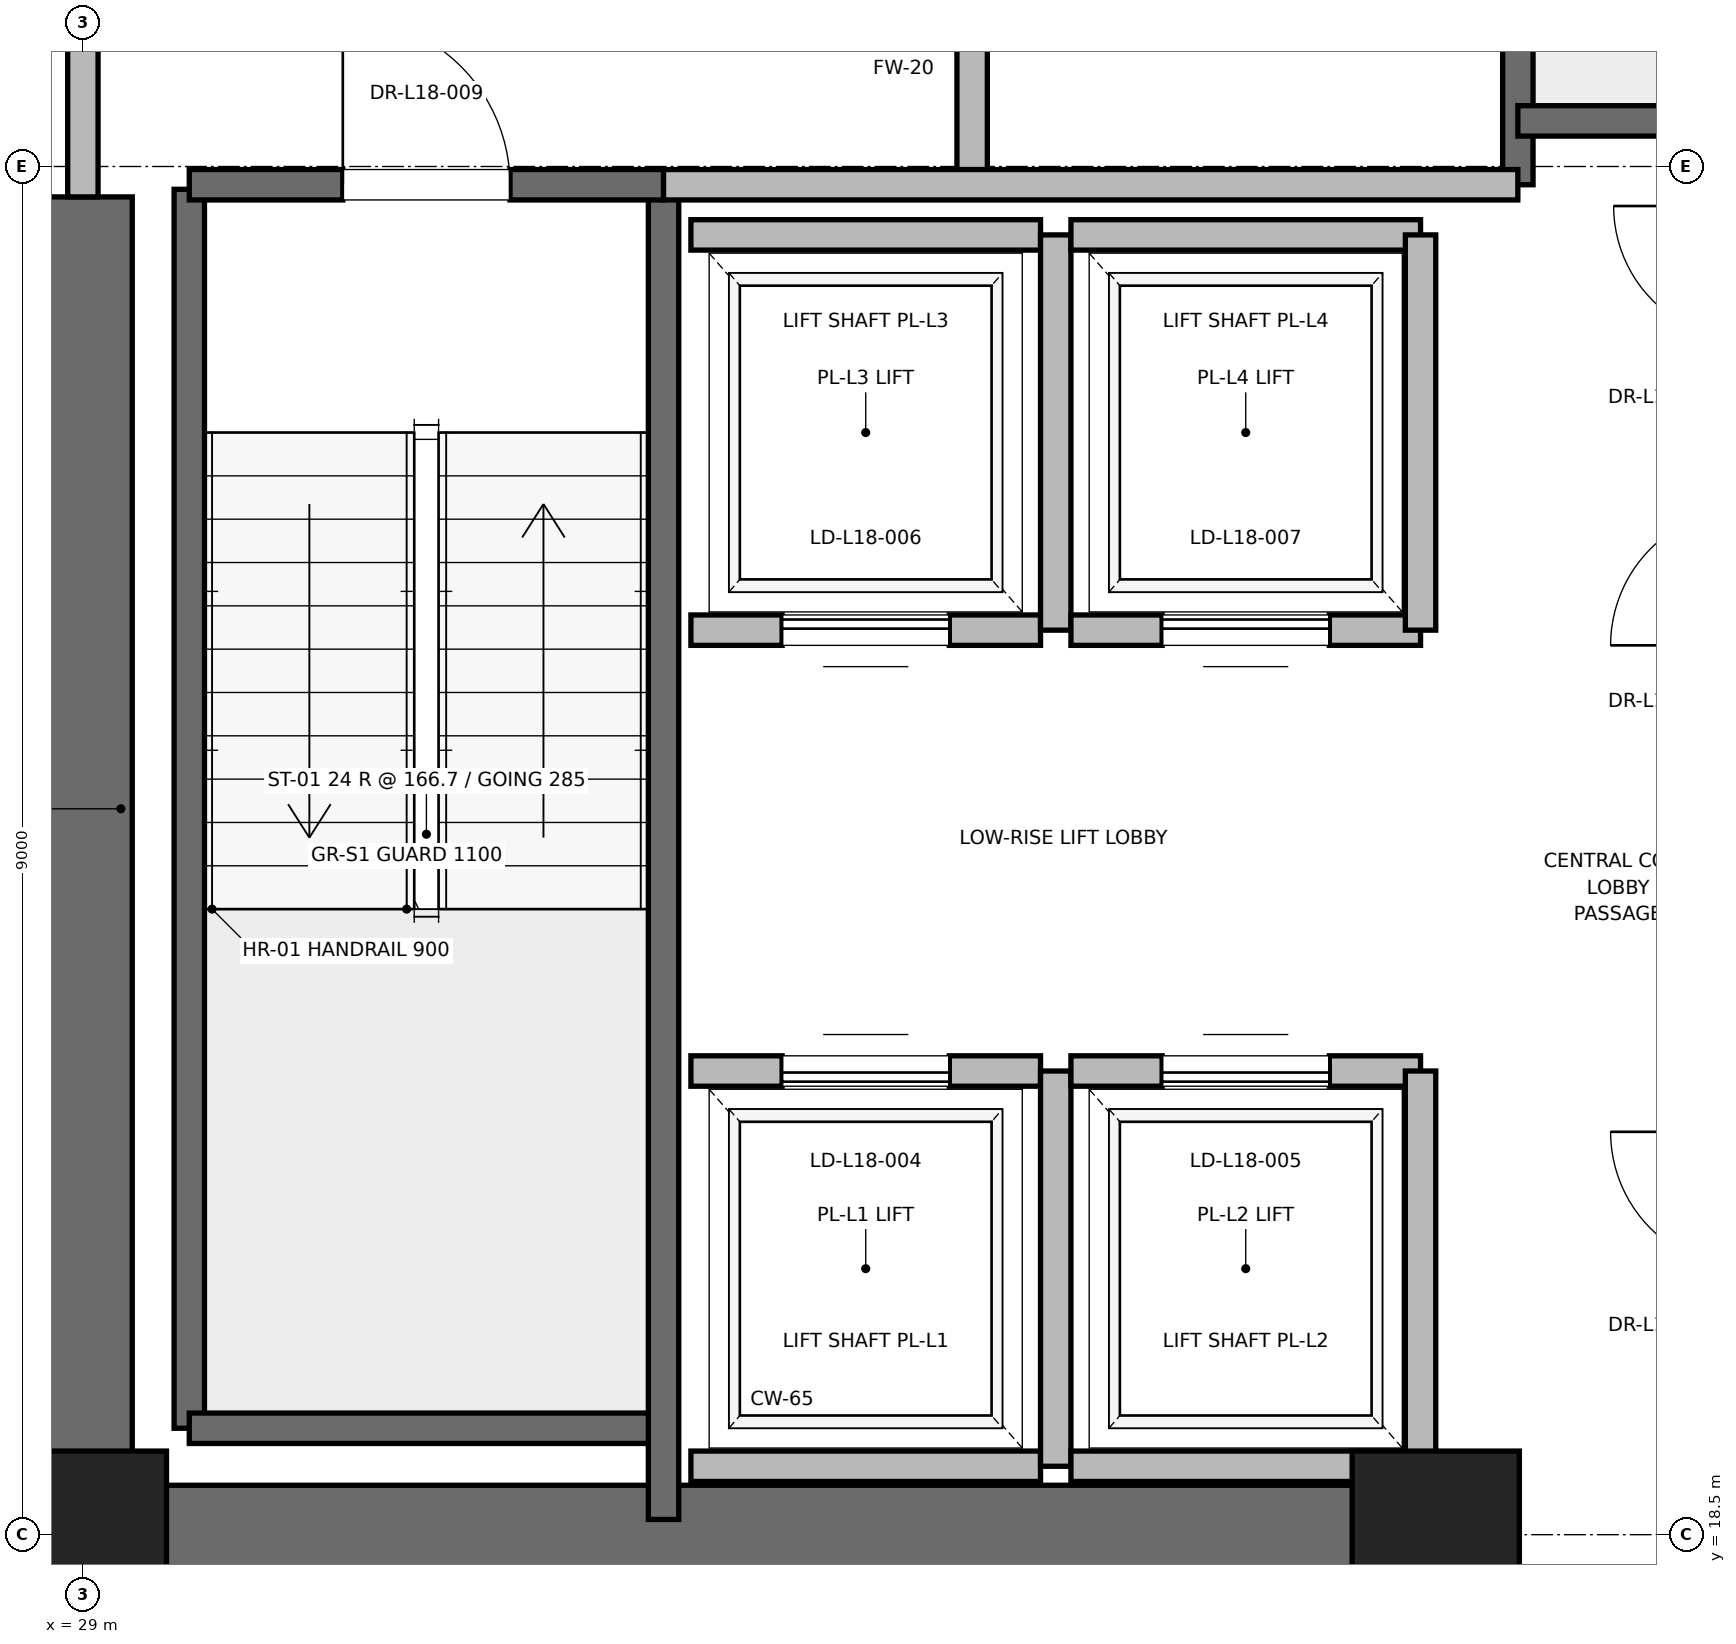
"""IFC4 building model, lengths in metres.
Left out: names, types, materials, properties, quantities, classifications, styles, units other than length and angle.
Written with IfcOpenShell. Run it as: python <this file> out.ifc"""

import sys

from ifc_helpers import new_model, si_unit, direction, frame, frame_2d, origin, origin_2d, place, context, subcontext, project, spatial, rectangle, extrude, element, fill, save


model = new_model("IFC4")
c1 = context("Model", 3, precision=1e-05, world=origin(), true_north=direction((0.0, 1.0)))
c2 = subcontext(c1, "Body", "Model", "MODEL_VIEW")
j1 = project(units=[si_unit("LENGTHUNIT", "METRE"), si_unit("PLANEANGLEUNIT", "RADIAN")], contexts=[c1])
p1 = place(None, origin())
s1 = spatial("IfcSite", under=j1, at=p1, CompositionType="ELEMENT")
p2 = place(p1, origin())
s2 = spatial("IfcBuilding", under=s1, at=p2, CompositionType="ELEMENT")
p3 = place(p2, frame((0.0, 0.0, 79.6)))
s3 = spatial("IfcBuildingStorey", under=s2, at=p3, CompositionType="ELEMENT", Elevation=79.6)
for number, where, z_axis, x_axis in (
    (1, (29.0, 18.5, 0.0), (0.0, 0.0, 1.0), (1.0, 0.0, 0.0)),
    (2, (37.9, 18.5, 0.0), (0.0, 0.0, 1.0), (1.0, 0.0, 0.0)),
):
    element("IfcColumn", number, at=place(p3, frame(where, z_axis=z_axis, x_axis=x_axis)), inside=s3, PredefinedType="PILASTER", context=c2, shape_type="SweptSolid", body=[
        extrude(rectangle(XDim=1.1, YDim=1.1, at=origin_2d()), origin(), (0.0, 0.0, 1.0), 4.0),
    ])
p4 = place(p3, frame((29.0, 18.5, 0.0), z_axis=(0.0, 0.0, 1.0), x_axis=(1.0, 0.0, 0.0)))
e3 = element("IfcWall", 3, at=p4, inside=s3, PredefinedType="SHEAR", context=c2, shape_type="SweptSolid", body=[
    extrude(rectangle(XDim=9.2, YDim=0.65, at=frame_2d((4.6, 0.0))), origin(), (0.0, 0.0, 1.0), 3.76),
])
p5 = place(p3, frame((29.0, 18.5, 0.0), z_axis=(0.0, 0.0, 1.0), x_axis=(0.0, 1.0, 0.0)))
e4 = element("IfcWall", 4, at=p5, inside=s3, PredefinedType="SHEAR", context=c2, shape_type="SweptSolid", body=[
    extrude(rectangle(XDim=8.8, YDim=0.65, at=frame_2d((4.4, 0.0))), origin(), (0.0, 0.0, 1.0), 3.76),
])
p6 = place(p3, frame((29.7, 19.2, 0.0), z_axis=(0.0, 0.0, 1.0), x_axis=(0.0, 1.0, 0.0)))
e5 = element("IfcWall", 5, at=p6, inside=s3, PredefinedType="SOLIDWALL", context=c2, shape_type="SweptSolid", body=[
    extrude(rectangle(XDim=8.15, YDim=0.2, at=frame_2d((4.075, 0.0))), origin(), (0.0, 0.0, 1.0), 3.76),
])
p7 = place(p3, frame((29.7, 19.2, 0.0), z_axis=(0.0, 0.0, 1.0), x_axis=(1.0, 0.0, 0.0)))
e6 = element("IfcWall", 6, at=p7, inside=s3, PredefinedType="SOLIDWALL", context=c2, shape_type="SweptSolid", body=[
    extrude(rectangle(XDim=3.12, YDim=0.2, at=frame_2d((1.56, 0.0))), origin(), (0.0, 0.0, 1.0), 3.76),
])
p8 = place(p3, frame((32.82, 18.6, 0.0), z_axis=(0.0, 0.0, 1.0), x_axis=(0.0, 1.0, 0.0)))
e7 = element("IfcWall", 7, at=p8, inside=s3, PredefinedType="SOLIDWALL", context=c2, shape_type="SweptSolid", body=[
    extrude(rectangle(XDim=8.78, YDim=0.2, at=frame_2d((4.39, 0.0))), origin(), (0.0, 0.0, 1.0), 3.76),
])
p9 = place(p3, frame((29.7, 27.38, 0.0), z_axis=(0.0, 0.0, 1.0), x_axis=(1.0, 0.0, 0.0)))
e8 = element("IfcWall", 8, at=p9, inside=s3, PredefinedType="SOLIDWALL", context=c2, shape_type="SweptSolid", body=[
    extrude(rectangle(XDim=3.12, YDim=0.2, at=frame_2d((1.56, 0.0))), origin(), (0.0, 0.0, 1.0), 3.76),
])
p10 = place(p9, frame((1.01, 0.0, 0.0)))
e9 = element("IfcOpeningElement", 9, at=p10, cuts=e8, PredefinedType="OPENING", context=c2, shape_type="SweptSolid", body=[
    extrude(rectangle(XDim=1.1, YDim=2.15, at=frame_2d((0.55, 1.075))), frame((0.0, 0.1, 0.0), z_axis=(0.0, -1.0, 0.0), x_axis=(1.0, 0.0, 0.0)), (0.0, 0.0, 1.0), 0.2),
])
p11 = place(p3, frame((38.44, 27.38, 0.0), z_axis=(0.0, 0.0, 1.0), x_axis=(0.0, 1.0, 0.0)))
e10 = element("IfcWall", 10, at=p11, inside=s3, PredefinedType="SOLIDWALL", context=c2, shape_type="SweptSolid", body=[
    extrude(rectangle(XDim=8.87, YDim=0.2, at=frame_2d((4.435, 0.0))), origin(), (0.0, 0.0, 1.0), 3.76),
])
p12 = place(p3, frame((38.44, 27.8, 0.0), z_axis=(0.0, 0.0, 1.0), x_axis=(1.0, 0.0, 0.0)))
e11 = element("IfcWall", 11, at=p12, inside=s3, PredefinedType="SOLIDWALL", context=c2, shape_type="SweptSolid", body=[
    extrude(rectangle(XDim=3.32, YDim=0.2, at=frame_2d((1.66, 0.0))), origin(), (0.0, 0.0, 1.0), 3.76),
])
p13 = place(p3, frame((34.85, 27.38, 0.0), z_axis=(0.0, 0.0, 1.0), x_axis=(0.0, 1.0, 0.0)))
e12 = element("IfcWall", 12, at=p13, inside=s3, PredefinedType="PARTITIONING", context=c2, shape_type="SweptSolid", body=[
    extrude(rectangle(XDim=3.37, YDim=0.2, at=frame_2d((1.685, 0.0))), origin(), (0.0, 0.0, 1.0), 3.76),
])
p14 = place(p13, frame((1.11, 0.0, 0.0)))
e13 = element("IfcOpeningElement", 13, at=p14, cuts=e12, PredefinedType="OPENING", context=c2, shape_type="SweptSolid", body=[
    extrude(rectangle(XDim=1.15, YDim=2.2, at=frame_2d((0.575, 1.1))), frame((0.0, 0.1, 0.0), z_axis=(0.0, -1.0, 0.0), x_axis=(1.0, 0.0, 0.0)), (0.0, 0.0, 1.0), 0.2),
])
p15 = place(p3, frame((29.0, 27.3, 0.0), z_axis=(0.0, 0.0, 1.0), x_axis=(0.0, 1.0, 0.0)))
e14 = element("IfcWall", 14, at=p15, inside=s3, PredefinedType="PARTITIONING", context=c2, shape_type="SweptSolid", body=[
    extrude(rectangle(XDim=3.4, YDim=0.2, at=frame_2d((1.7, 0.0))), origin(), (0.0, 0.0, 1.0), 2.54),
])
p16 = place(p15, frame((1.125, 0.0, 0.0)))
e15 = element("IfcOpeningElement", 15, at=p16, cuts=e14, PredefinedType="OPENING", context=c2, shape_type="SweptSolid", body=[
    extrude(rectangle(XDim=1.15, YDim=2.2, at=frame_2d((0.575, 1.1))), frame((0.0, 0.1, 0.0), z_axis=(0.0, -1.0, 0.0), x_axis=(1.0, 0.0, 0.0)), (0.0, 0.0, 1.0), 0.2),
])
p17 = place(p3, frame((32.82, 27.38, 0.0), z_axis=(0.0, 0.0, 1.0), x_axis=(1.0, 0.0, 0.0)))
e16 = element("IfcWall", 16, at=p17, inside=s3, PredefinedType="PARTITIONING", context=c2, shape_type="SweptSolid", body=[
    extrude(rectangle(XDim=5.62, YDim=0.2, at=frame_2d((2.81, 0.0))), origin(), (0.0, 0.0, 1.0), 3.76),
])
p18 = place(p3, frame((33.0, 18.95, 0.0), z_axis=(0.0, 0.0, 1.0), x_axis=(1.0, 0.0, 0.0)))
e17 = element("IfcWall", 17, at=p18, inside=s3, PredefinedType="SOLIDWALL", context=c2, shape_type="SweptSolid", body=[
    extrude(rectangle(XDim=2.3, YDim=0.2, at=frame_2d((1.15, 0.0))), origin(), (0.0, 0.0, 1.0), 3.76),
])
p19 = place(p3, frame((35.3, 21.55, 0.0), z_axis=(0.0, 0.0, 1.0), x_axis=(-1.0, 0.0, 0.0)))
e18 = element("IfcWall", 18, at=p19, inside=s3, PredefinedType="SOLIDWALL", context=c2, shape_type="SweptSolid", body=[
    extrude(rectangle(XDim=2.3, YDim=0.2, at=frame_2d((1.15, 0.0))), origin(), (0.0, 0.0, 1.0), 3.76),
])
p20 = place(p19, frame((0.6, 0.0, 0.0)))
e19 = element("IfcOpeningElement", 19, at=p20, cuts=e18, PredefinedType="OPENING", context=c2, shape_type="SweptSolid", body=[
    extrude(rectangle(XDim=1.1, YDim=2.2, at=frame_2d((0.55, 1.1))), frame((0.0, 0.1, 0.0), z_axis=(0.0, -1.0, 0.0), x_axis=(1.0, 0.0, 0.0)), (0.0, 0.0, 1.0), 0.2),
])
p21 = place(p3, frame((35.4, 18.95, 0.0), z_axis=(0.0, 0.0, 1.0), x_axis=(0.0, 1.0, 0.0)))
e20 = element("IfcWall", 20, at=p21, inside=s3, PredefinedType="SOLIDWALL", context=c2, shape_type="SweptSolid", body=[
    extrude(rectangle(XDim=2.6, YDim=0.2, at=frame_2d((1.3, 0.0))), origin(), (0.0, 0.0, 1.0), 3.76),
])
p22 = place(p3, frame((35.5, 18.95, 0.0), z_axis=(0.0, 0.0, 1.0), x_axis=(1.0, 0.0, 0.0)))
e21 = element("IfcWall", 21, at=p22, inside=s3, PredefinedType="SOLIDWALL", context=c2, shape_type="SweptSolid", body=[
    extrude(rectangle(XDim=2.3, YDim=0.2, at=frame_2d((1.15, 0.0))), origin(), (0.0, 0.0, 1.0), 2.54),
])
p23 = place(p3, frame((37.8, 21.55, 0.0), z_axis=(0.0, 0.0, 1.0), x_axis=(-1.0, 0.0, 0.0)))
e22 = element("IfcWall", 22, at=p23, inside=s3, PredefinedType="SOLIDWALL", context=c2, shape_type="SweptSolid", body=[
    extrude(rectangle(XDim=2.3, YDim=0.2, at=frame_2d((1.15, 0.0))), origin(), (0.0, 0.0, 1.0), 3.76),
])
p24 = place(p23, frame((0.6, 0.0, 0.0)))
e23 = element("IfcOpeningElement", 23, at=p24, cuts=e22, PredefinedType="OPENING", context=c2, shape_type="SweptSolid", body=[
    extrude(rectangle(XDim=1.1, YDim=2.2, at=frame_2d((0.55, 1.1))), frame((0.0, 0.1, 0.0), z_axis=(0.0, -1.0, 0.0), x_axis=(1.0, 0.0, 0.0)), (0.0, 0.0, 1.0), 0.2),
])
p25 = place(p3, frame((37.8, 18.95, 0.0), z_axis=(0.0, 0.0, 1.0), x_axis=(0.0, 1.0, 0.0)))
e24 = element("IfcWall", 24, at=p25, inside=s3, PredefinedType="SOLIDWALL", context=c2, shape_type="SweptSolid", body=[
    extrude(rectangle(XDim=2.6, YDim=0.2, at=frame_2d((1.3, 0.0))), origin(), (0.0, 0.0, 1.0), 2.54),
])
p26 = place(p3, frame((33.0, 24.45, 0.0), z_axis=(0.0, 0.0, 1.0), x_axis=(1.0, 0.0, 0.0)))
e25 = element("IfcWall", 25, at=p26, inside=s3, PredefinedType="SOLIDWALL", context=c2, shape_type="SweptSolid", body=[
    extrude(rectangle(XDim=2.3, YDim=0.2, at=frame_2d((1.15, 0.0))), origin(), (0.0, 0.0, 1.0), 3.76),
])
p27 = place(p26, frame((0.6, 0.0, 0.0)))
e26 = element("IfcOpeningElement", 26, at=p27, cuts=e25, PredefinedType="OPENING", context=c2, shape_type="SweptSolid", body=[
    extrude(rectangle(XDim=1.1, YDim=2.2, at=frame_2d((0.55, 1.1))), frame((0.0, 0.1, 0.0), z_axis=(0.0, -1.0, 0.0), x_axis=(1.0, 0.0, 0.0)), (0.0, 0.0, 1.0), 0.2),
])
p28 = place(p3, frame((35.3, 27.05, 0.0), z_axis=(0.0, 0.0, 1.0), x_axis=(-1.0, 0.0, 0.0)))
e27 = element("IfcWall", 27, at=p28, inside=s3, PredefinedType="SOLIDWALL", context=c2, shape_type="SweptSolid", body=[
    extrude(rectangle(XDim=2.3, YDim=0.2, at=frame_2d((1.15, 0.0))), origin(), (0.0, 0.0, 1.0), 3.76),
])
p29 = place(p3, frame((35.4, 24.45, 0.0), z_axis=(0.0, 0.0, 1.0), x_axis=(0.0, 1.0, 0.0)))
e28 = element("IfcWall", 28, at=p29, inside=s3, PredefinedType="SOLIDWALL", context=c2, shape_type="SweptSolid", body=[
    extrude(rectangle(XDim=2.6, YDim=0.2, at=frame_2d((1.3, 0.0))), origin(), (0.0, 0.0, 1.0), 3.76),
])
p30 = place(p3, frame((35.5, 24.45, 0.0), z_axis=(0.0, 0.0, 1.0), x_axis=(1.0, 0.0, 0.0)))
e29 = element("IfcWall", 29, at=p30, inside=s3, PredefinedType="SOLIDWALL", context=c2, shape_type="SweptSolid", body=[
    extrude(rectangle(XDim=2.3, YDim=0.2, at=frame_2d((1.15, 0.0))), origin(), (0.0, 0.0, 1.0), 3.76),
])
p31 = place(p30, frame((0.6, 0.0, 0.0)))
e30 = element("IfcOpeningElement", 30, at=p31, cuts=e29, PredefinedType="OPENING", context=c2, shape_type="SweptSolid", body=[
    extrude(rectangle(XDim=1.1, YDim=2.2, at=frame_2d((0.55, 1.1))), frame((0.0, 0.1, 0.0), z_axis=(0.0, -1.0, 0.0), x_axis=(1.0, 0.0, 0.0)), (0.0, 0.0, 1.0), 0.2),
])
p32 = place(p3, frame((37.8, 27.05, 0.0), z_axis=(0.0, 0.0, 1.0), x_axis=(-1.0, 0.0, 0.0)))
e31 = element("IfcWall", 31, at=p32, inside=s3, PredefinedType="SOLIDWALL", context=c2, shape_type="SweptSolid", body=[
    extrude(rectangle(XDim=2.3, YDim=0.2, at=frame_2d((1.15, 0.0))), origin(), (0.0, 0.0, 1.0), 3.76),
])
p33 = place(p3, frame((37.8, 24.45, 0.0), z_axis=(0.0, 0.0, 1.0), x_axis=(0.0, 1.0, 0.0)))
e32 = element("IfcWall", 32, at=p33, inside=s3, PredefinedType="SOLIDWALL", context=c2, shape_type="SweptSolid", body=[
    extrude(rectangle(XDim=2.6, YDim=0.2, at=frame_2d((1.3, 0.0))), origin(), (0.0, 0.0, 1.0), 3.76),
])
p34 = place(p10, origin())
e33 = element("IfcDoor", 33, at=p34, inside=s3, OperationType="SINGLE_SWING_LEFT", PredefinedType="DOOR", context=c2, shape_type="SweptSolid", body=[
    extrude(rectangle(XDim=1.1, YDim=2.15, at=frame_2d((0.55, 1.075))), frame((0.0, 0.025, 0.0), z_axis=(0.0, -1.0, 0.0), x_axis=(1.0, 0.0, 0.0)), (0.0, 0.0, 1.0), 0.05),
])
fill(e9, e33)
p35 = place(p20, origin())
e34 = element("IfcDoor", 34, at=p35, inside=s3, OperationType="SLIDING_TO_RIGHT", PredefinedType="DOOR", context=c2, shape_type="SweptSolid", body=[
    extrude(rectangle(XDim=1.1, YDim=2.2, at=frame_2d((0.55, 1.1))), frame((0.0, 0.025, 0.0), z_axis=(0.0, -1.0, 0.0), x_axis=(1.0, 0.0, 0.0)), (0.0, 0.0, 1.0), 0.05),
])
fill(e19, e34)
p36 = place(p24, origin())
e35 = element("IfcDoor", 35, at=p36, inside=s3, OperationType="SLIDING_TO_RIGHT", PredefinedType="DOOR", context=c2, shape_type="SweptSolid", body=[
    extrude(rectangle(XDim=1.1, YDim=2.2, at=frame_2d((0.55, 1.1))), frame((0.0, 0.025, 0.0), z_axis=(0.0, -1.0, 0.0), x_axis=(1.0, 0.0, 0.0)), (0.0, 0.0, 1.0), 0.05),
])
fill(e23, e35)
p37 = place(p27, origin())
e36 = element("IfcDoor", 36, at=p37, inside=s3, OperationType="SLIDING_TO_RIGHT", PredefinedType="DOOR", context=c2, shape_type="SweptSolid", body=[
    extrude(rectangle(XDim=1.1, YDim=2.2, at=frame_2d((0.55, 1.1))), frame((0.0, 0.025, 0.0), z_axis=(0.0, -1.0, 0.0), x_axis=(1.0, 0.0, 0.0)), (0.0, 0.0, 1.0), 0.05),
])
fill(e26, e36)
p38 = place(p31, origin())
e37 = element("IfcDoor", 37, at=p38, inside=s3, OperationType="SLIDING_TO_RIGHT", PredefinedType="DOOR", context=c2, shape_type="SweptSolid", body=[
    extrude(rectangle(XDim=1.1, YDim=2.2, at=frame_2d((0.55, 1.1))), frame((0.0, 0.025, 0.0), z_axis=(0.0, -1.0, 0.0), x_axis=(1.0, 0.0, 0.0)), (0.0, 0.0, 1.0), 0.05),
])
fill(e30, e37)
save(model, sys.argv[1])
